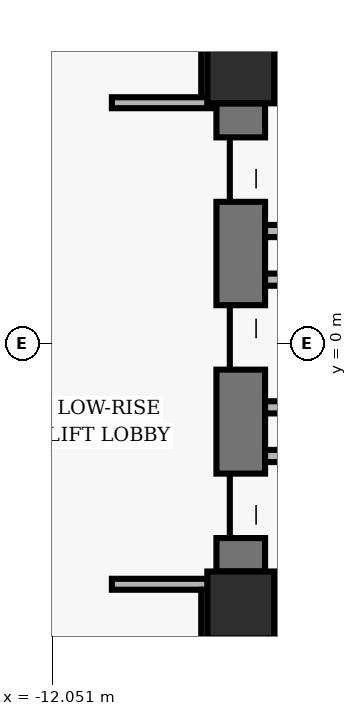
"""IFC4 building model, lengths in metres.
Left out: names, types, materials, properties, quantities, classifications, styles, units other than length and angle.
Written with IfcOpenShell. Run it as: python <this file> out.ifc"""

import sys

from ifc_helpers import new_model, si_unit, direction, frame, frame_2d, origin, origin_2d, place, context, subcontext, project, spatial, rectangle, hollow_rectangle, extrude, element, fill, save


model = new_model("IFC4")
c1 = context("Model", 3, precision=1e-05, world=origin(), true_north=direction((0.0, 1.0)))
c2 = subcontext(c1, "Body", "Model", "MODEL_VIEW")
j1 = project(units=[si_unit("LENGTHUNIT", "METRE"), si_unit("PLANEANGLEUNIT", "RADIAN")], contexts=[c1])
p1 = place(None, origin())
s1 = spatial("IfcSite", under=j1, at=p1, CompositionType="ELEMENT")
p2 = place(p1, origin())
s2 = spatial("IfcBuilding", under=s1, at=p2, CompositionType="ELEMENT")
p3 = place(p2, frame((0.0, 0.0, 11.84)))
s3 = spatial("IfcBuildingStorey", under=s2, at=p3, CompositionType="ELEMENT", Elevation=11.84)
for number, where, z_axis, x_axis in (
    (1, (-8.95, 4.5, 0.0), (0.0, 0.0, 1.0), (1.0, 0.0, 0.0)),
    (2, (-8.95, -4.3, 0.0), (0.0, 0.0, 1.0), (1.0, 0.0, 0.0)),
):
    element("IfcColumn", number, at=place(p3, frame(where, z_axis=z_axis, x_axis=x_axis)), inside=s3, PredefinedType="COLUMN", context=c2, shape_type="SweptSolid", body=[
        extrude(hollow_rectangle(XDim=1.1, YDim=1.1, WallThickness=0.07, InnerFilletRadius=0.02, OuterFilletRadius=0.04, at=origin_2d()), origin(), (0.0, 0.0, 1.0), 3.52),
    ])
p4 = place(p3, frame((-8.95, -3.75, 0.0), z_axis=(0.0, 0.0, 1.0), x_axis=(0.0, 1.0, 0.0)))
e3 = element("IfcWall", 3, at=p4, inside=s3, PredefinedType="SHEAR", context=c2, shape_type="SweptSolid", body=[
    extrude(rectangle(XDim=7.7, YDim=0.8, at=frame_2d((3.85, 0.0))), origin(), (0.0, 0.0, 1.0), 3.178),
])
p5 = place(p4, frame((0.55, 0.0, 0.0)))
e4 = element("IfcOpeningElement", 4, at=p5, cuts=e3, PredefinedType="OPENING", context=c2, shape_type="SweptSolid", body=[
    extrude(rectangle(XDim=1.06, YDim=2.04, at=frame_2d((0.53, 1.02))), frame((0.0, 0.41, 0.0), z_axis=(0.0, -1.0, 0.0), x_axis=(1.0, 0.0, 0.0)), (0.0, 0.0, 1.0), 0.82),
])
p6 = place(p4, frame((3.32, 0.0, 0.0)))
e5 = element("IfcOpeningElement", 5, at=p6, cuts=e3, PredefinedType="OPENING", context=c2, shape_type="SweptSolid", body=[
    extrude(rectangle(XDim=1.06, YDim=2.04, at=frame_2d((0.53, 1.02))), frame((0.0, 0.41, 0.0), z_axis=(0.0, -1.0, 0.0), x_axis=(1.0, 0.0, 0.0)), (0.0, 0.0, 1.0), 0.82),
])
p7 = place(p4, frame((6.08, 0.0, 0.0)))
e6 = element("IfcOpeningElement", 6, at=p7, cuts=e3, PredefinedType="OPENING", context=c2, shape_type="SweptSolid", body=[
    extrude(rectangle(XDim=1.06, YDim=2.04, at=frame_2d((0.53, 1.02))), frame((0.0, 0.41, 0.0), z_axis=(0.0, -1.0, 0.0), x_axis=(1.0, 0.0, 0.0)), (0.0, 0.0, 1.0), 0.82),
])
for number, where, z_axis, x_axis in (
    (7, (-8.4, 4.5, 0.0), (0.0, 0.0, 1.0), (1.0, 0.0, 0.0)),
    (8, (-8.4, -4.3, 0.0), (0.0, 0.0, 1.0), (1.0, 0.0, 0.0)),
):
    element("IfcWall", number, at=place(p3, frame(where, z_axis=z_axis, x_axis=x_axis)), inside=s3, PredefinedType="SHEAR", context=c2, shape_type="SweptSolid", body=[
        extrude(rectangle(XDim=1.8, YDim=0.4, at=frame_2d((0.9, 0.0))), origin(), (0.0, 0.0, 1.0), 3.178),
    ])
for number, where, z_axis, x_axis in (
    (9, (-8.55, -1.85, 0.0), (0.0, 0.0, 1.0), (1.0, 0.0, 0.0)),
    (10, (-8.55, 1.85, 0.0), (0.0, 0.0, 1.0), (1.0, 0.0, 0.0)),
):
    element("IfcWall", number, at=place(p3, frame(where, z_axis=z_axis, x_axis=x_axis)), inside=s3, PredefinedType="PARTITIONING", context=c2, shape_type="SweptSolid", body=[
        extrude(rectangle(XDim=2.1, YDim=0.2, at=frame_2d((1.05, 0.0))), origin(), (0.0, 0.0, 1.0), 3.153),
    ])
for number, where, z_axis, x_axis in (
    (11, (-8.55, -1.05, 0.0), (0.0, 0.0, 1.0), (1.0, 0.0, 0.0)),
    (12, (-8.55, 1.05, 0.0), (0.0, 0.0, 1.0), (1.0, 0.0, 0.0)),
):
    element("IfcWall", number, at=place(p3, frame(where, z_axis=z_axis, x_axis=x_axis)), inside=s3, PredefinedType="PARTITIONING", context=c2, shape_type="SweptSolid", body=[
        extrude(rectangle(XDim=1.91, YDim=0.2, at=frame_2d((0.955, 0.0))), origin(), (0.0, 0.0, 1.0), 3.153),
    ])
p8 = place(p3, frame((-11.07, -3.96, 0.0), z_axis=(0.0, 0.0, 1.0), x_axis=(1.0, 0.0, 0.0)))
e13 = element("IfcWall", 13, at=p8, inside=s3, PredefinedType="PARTITIONING", context=c2, shape_type="SweptSolid", body=[
    extrude(rectangle(XDim=1.65, YDim=0.18, at=frame_2d((0.825, 0.0))), origin(), (0.0, 0.0, 1.0), 2.206),
])
for number, where, z_axis, x_axis in (
    (14, (-9.51, -4.05, 0.0), (0.0, 0.0, 1.0), (0.0, -1.0, 0.0)),
    (15, (-9.51, 4.87, 0.0), (0.0, 0.0, 1.0), (0.0, -1.0, 0.0)),
):
    element("IfcWall", number, at=place(p3, frame(where, z_axis=z_axis, x_axis=x_axis)), inside=s3, PredefinedType="PARTITIONING", context=c2, shape_type="SweptSolid", body=[
        extrude(rectangle(XDim=0.82, YDim=0.18, at=frame_2d((0.41, 0.0))), origin(), (0.0, 0.0, 1.0), 3.153),
    ])
p9 = place(p3, frame((-9.42, 3.96, 0.0), z_axis=(0.0, 0.0, 1.0), x_axis=(-1.0, 0.0, 0.0)))
e16 = element("IfcWall", 16, at=p9, inside=s3, PredefinedType="PARTITIONING", context=c2, shape_type="SweptSolid", body=[
    extrude(rectangle(XDim=1.65, YDim=0.18, at=frame_2d((0.825, 0.0))), origin(), (0.0, 0.0, 1.0), 3.153),
])
p10 = place(p5, origin())
e17 = element("IfcDoor", 17, at=p10, inside=s3, OperationType="SLIDING_TO_LEFT", PredefinedType="DOOR", context=c2, shape_type="SweptSolid", body=[
    extrude(rectangle(XDim=1.06, YDim=2.04, at=frame_2d((0.53, 1.02))), frame((0.0, 0.025, 0.0), z_axis=(0.0, -1.0, 0.0), x_axis=(1.0, 0.0, 0.0)), (0.0, 0.0, 1.0), 0.05),
])
fill(e4, e17)
p11 = place(p6, origin())
e18 = element("IfcDoor", 18, at=p11, inside=s3, OperationType="SLIDING_TO_RIGHT", PredefinedType="DOOR", context=c2, shape_type="SweptSolid", body=[
    extrude(rectangle(XDim=1.06, YDim=2.04, at=frame_2d((0.53, 1.02))), frame((0.0, 0.025, 0.0), z_axis=(0.0, -1.0, 0.0), x_axis=(1.0, 0.0, 0.0)), (0.0, 0.0, 1.0), 0.05),
])
fill(e5, e18)
p12 = place(p7, origin())
e19 = element("IfcDoor", 19, at=p12, inside=s3, OperationType="SLIDING_TO_LEFT", PredefinedType="DOOR", context=c2, shape_type="SweptSolid", body=[
    extrude(rectangle(XDim=1.06, YDim=2.04, at=frame_2d((0.53, 1.02))), frame((0.0, 0.025, 0.0), z_axis=(0.0, -1.0, 0.0), x_axis=(1.0, 0.0, 0.0)), (0.0, 0.0, 1.0), 0.05),
])
fill(e6, e19)
save(model, sys.argv[1])
